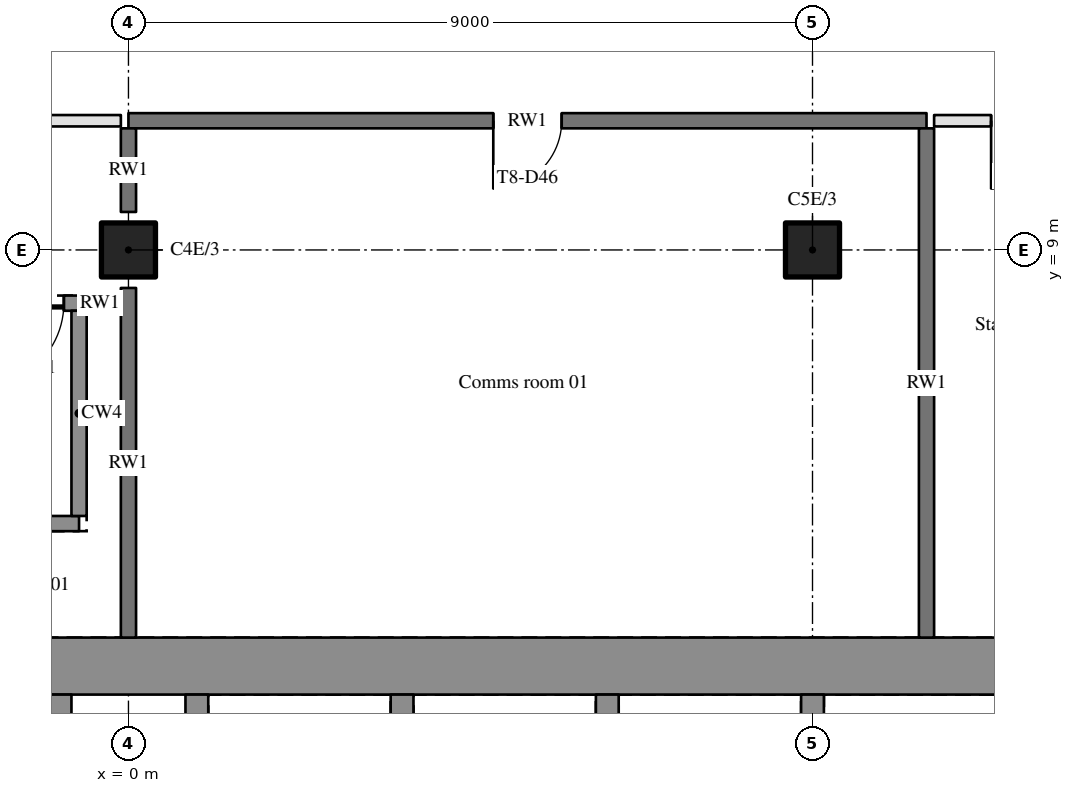
"""IFC4 building model, lengths in metres.
Left out: names, types, materials, properties, quantities, classifications, styles, units other than length and angle.
Written with IfcOpenShell. Run it as: python <this file> out.ifc"""

import sys

from ifc_helpers import new_model, si_unit, direction, frame, frame_2d, origin, origin_2d, place, context, subcontext, project, spatial, rectangle, hollow_circle, extrude, element, fill, save


model = new_model("IFC4")
c1 = context("Model", 3, precision=1e-05, world=origin(), true_north=direction((0.0, 1.0)))
c2 = subcontext(c1, "Body", "Model", "MODEL_VIEW")
j1 = project(units=[si_unit("LENGTHUNIT", "METRE"), si_unit("PLANEANGLEUNIT", "RADIAN")], contexts=[c1])
p1 = place(None, origin())
s1 = spatial("IfcSite", under=j1, at=p1, CompositionType="ELEMENT")
p2 = place(p1, origin())
s2 = spatial("IfcBuilding", under=s1, at=p2, CompositionType="ELEMENT")
p3 = place(p2, frame((0.0, 0.0, 121.5)))
s3 = spatial("IfcBuildingStorey", under=s2, at=p3, CompositionType="ELEMENT", Elevation=121.5)
for number, where, z_axis, x_axis in (
    (1, (0.0, 9.0, 0.0), (0.0, 0.0, 1.0), (1.0, 0.0, 0.0)),
    (2, (9.0, 9.0, 0.0), (0.0, 0.0, 1.0), (1.0, 0.0, 0.0)),
):
    element("IfcColumn", number, at=place(p3, frame(where, z_axis=z_axis, x_axis=x_axis)), inside=s3, PredefinedType="COLUMN", context=c2, shape_type="SweptSolid", body=[
        extrude(hollow_circle(Radius=0.355, WallThickness=0.032, at=origin_2d()), origin(), (0.0, 0.0, 1.0), 3.4),
    ])
p4 = place(p3, frame((-13.0, 3.525, 0.0), z_axis=(0.0, 0.0, 1.0), x_axis=(1.0, 0.0, 0.0)))
e3 = element("IfcWall", 3, at=p4, inside=s3, PredefinedType="SHEAR", context=c2, shape_type="SweptSolid", body=[
    extrude(rectangle(XDim=26.0, YDim=0.75, at=frame_2d((13.0, 0.0))), origin(), (0.0, 0.0, 1.0), 3.4),
])
p5 = place(p3, frame((-7.25, 5.4, 0.0), z_axis=(0.0, 0.0, 1.0), x_axis=(1.0, 0.0, 0.0)))
e4 = element("IfcWall", 4, at=p5, inside=s3, PredefinedType="SHEAR", context=c2, shape_type="SweptSolid", body=[
    extrude(rectangle(XDim=6.6, YDim=0.2, at=frame_2d((3.3, 0.0))), origin(), (0.0, 0.0, 1.0), 3.4),
])
p6 = place(p3, frame((-0.65, 8.3, 0.0), z_axis=(0.0, 0.0, 1.0), x_axis=(-1.0, 0.0, 0.0)))
e5 = element("IfcWall", 5, at=p6, inside=s3, PredefinedType="SHEAR", context=c2, shape_type="SweptSolid", body=[
    extrude(rectangle(XDim=6.6, YDim=0.2, at=frame_2d((3.3, 0.0))), origin(), (0.0, 0.0, 1.0), 3.4),
])
p7 = place(p6, frame((0.2, 0.0, 0.0)))
e6 = element("IfcOpeningElement", 6, at=p7, cuts=e5, PredefinedType="OPENING", context=c2, shape_type="SweptSolid", body=[
    extrude(rectangle(XDim=1.1, YDim=2.1, at=frame_2d((0.55, 1.05))), frame((0.0, 0.11, 0.0), z_axis=(0.0, -1.0, 0.0), x_axis=(1.0, 0.0, 0.0)), (0.0, 0.0, 1.0), 0.22),
])
p8 = place(p3, frame((-0.65, 8.3, 0.0), z_axis=(0.0, 0.0, 1.0), x_axis=(1.0, 0.0, 0.0)))
e7 = element("IfcWall", 7, at=p8, inside=s3, PredefinedType="SOLIDWALL", context=c2, shape_type="SweptSolid", body=[
    extrude(rectangle(XDim=0.55, YDim=0.2, at=frame_2d((0.275, 0.0))), origin(), (0.0, 0.0, 1.0), 2.46),
])
p9 = place(p3, frame((-0.1, 10.7, 0.0), z_axis=(0.0, 0.0, 1.0), x_axis=(-1.0, 0.0, 0.0)))
e8 = element("IfcWall", 8, at=p9, inside=s3, PredefinedType="PARTITIONING", context=c2, shape_type="SweptSolid", body=[
    extrude(rectangle(XDim=7.05, YDim=0.15, at=frame_2d((3.525, 0.0))), origin(), (0.0, 0.0, 1.0), 2.46),
])
p10 = place(p9, frame((3.025, 0.0, 0.0)))
e9 = element("IfcOpeningElement", 9, at=p10, cuts=e8, PredefinedType="OPENING", context=c2, shape_type="SweptSolid", body=[
    extrude(rectangle(XDim=1.0, YDim=2.1, at=frame_2d((0.5, 1.05))), frame((0.0, 0.085, 0.0), z_axis=(0.0, -1.0, 0.0), x_axis=(1.0, 0.0, 0.0)), (0.0, 0.0, 1.0), 0.17),
])
p11 = place(p3, frame((10.5, 10.7, 0.0), z_axis=(0.0, 0.0, 1.0), x_axis=(-1.0, 0.0, 0.0)))
e10 = element("IfcWall", 10, at=p11, inside=s3, PredefinedType="SOLIDWALL", context=c2, shape_type="SweptSolid", body=[
    extrude(rectangle(XDim=10.5, YDim=0.2, at=frame_2d((5.25, 0.0))), origin(), (0.0, 0.0, 1.0), 2.46),
])
p12 = place(p11, frame((4.8, 0.0, 0.0)))
e11 = element("IfcOpeningElement", 11, at=p12, cuts=e10, PredefinedType="OPENING", context=c2, shape_type="SweptSolid", body=[
    extrude(rectangle(XDim=0.9, YDim=2.1, at=frame_2d((0.45, 1.05))), frame((0.0, 0.11, 0.0), z_axis=(0.0, -1.0, 0.0), x_axis=(1.0, 0.0, 0.0)), (0.0, 0.0, 1.0), 0.22),
])
p13 = place(p3, frame((16.05, 10.7, 0.0), z_axis=(0.0, 0.0, 1.0), x_axis=(-1.0, 0.0, 0.0)))
e12 = element("IfcWall", 12, at=p13, inside=s3, PredefinedType="PARTITIONING", context=c2, shape_type="SweptSolid", body=[
    extrude(rectangle(XDim=5.45, YDim=0.15, at=frame_2d((2.725, 0.0))), origin(), (0.0, 0.0, 1.0), 2.46),
])
p14 = place(p13, frame((3.8, 0.0, 0.0)))
e13 = element("IfcOpeningElement", 13, at=p14, cuts=e12, PredefinedType="OPENING", context=c2, shape_type="SweptSolid", body=[
    extrude(rectangle(XDim=0.9, YDim=2.1, at=frame_2d((0.45, 1.05))), frame((0.0, 0.085, 0.0), z_axis=(0.0, -1.0, 0.0), x_axis=(1.0, 0.0, 0.0)), (0.0, 0.0, 1.0), 0.17),
])
p15 = place(p13, frame((1.075, 0.0, 0.0)))
e14 = element("IfcOpeningElement", 14, at=p15, cuts=e12, PredefinedType="OPENING", context=c2, shape_type="SweptSolid", body=[
    extrude(rectangle(XDim=0.9, YDim=2.1, at=frame_2d((0.45, 1.05))), frame((0.0, 0.085, 0.0), z_axis=(0.0, -1.0, 0.0), x_axis=(1.0, 0.0, 0.0)), (0.0, 0.0, 1.0), 0.17),
])
p16 = place(p3, frame((-0.9, 0.65, 0.0), z_axis=(0.0, 0.0, 1.0), x_axis=(0.0, 1.0, 0.0)))
e15 = element("IfcWall", 15, at=p16, inside=s3, PredefinedType="SHEAR", context=c2, shape_type="SweptSolid", body=[
    extrude(rectangle(XDim=2.5, YDim=0.3, at=frame_2d((1.25, 0.0))), origin(), (0.0, 0.0, 1.0), 3.4),
])
p17 = place(p3, frame((-0.65, 5.5, 0.0), z_axis=(0.0, 0.0, 1.0), x_axis=(0.0, 1.0, 0.0)))
e16 = element("IfcWall", 16, at=p17, inside=s3, PredefinedType="SHEAR", context=c2, shape_type="SweptSolid", body=[
    extrude(rectangle(XDim=2.7, YDim=0.2, at=frame_2d((1.35, 0.0))), origin(), (0.0, 0.0, 1.0), 3.4),
])
p18 = place(p3, frame((0.0, 3.9, 0.0), z_axis=(0.0, 0.0, 1.0), x_axis=(0.0, 1.0, 0.0)))
e17 = element("IfcWall", 17, at=p18, inside=s3, PredefinedType="SOLIDWALL", context=c2, shape_type="SweptSolid", body=[
    extrude(rectangle(XDim=4.6, YDim=0.2, at=frame_2d((2.3, 0.0))), origin(), (0.0, 0.0, 1.0), 2.46),
])
p19 = place(p3, frame((0.0, 9.5, 0.0), z_axis=(0.0, 0.0, 1.0), x_axis=(0.0, 1.0, 0.0)))
e18 = element("IfcWall", 18, at=p19, inside=s3, PredefinedType="SOLIDWALL", context=c2, shape_type="SweptSolid", body=[
    extrude(rectangle(XDim=1.1, YDim=0.2, at=frame_2d((0.55, 0.0))), origin(), (0.0, 0.0, 1.0), 2.46),
])
for number, where, z_axis, x_axis in (
    (19, (0.9, 0.65, 0.0), (0.0, 0.0, 1.0), (0.0, 1.0, 0.0)),
    (20, (3.6, 0.65, 0.0), (0.0, 0.0, 1.0), (0.0, 1.0, 0.0)),
    (21, (6.3, 0.65, 0.0), (0.0, 0.0, 1.0), (0.0, 1.0, 0.0)),
):
    element("IfcWall", number, at=place(p3, frame(where, z_axis=z_axis, x_axis=x_axis)), inside=s3, PredefinedType="SHEAR", context=c2, shape_type="SweptSolid", body=[
        extrude(rectangle(XDim=2.5, YDim=0.3, at=frame_2d((1.25, 0.0))), origin(), (0.0, 0.0, 1.0), 3.4),
    ])
p20 = place(p3, frame((9.0, 0.8, 0.0), z_axis=(0.0, 0.0, 1.0), x_axis=(0.0, 1.0, 0.0)))
e22 = element("IfcWall", 22, at=p20, inside=s3, PredefinedType="SHEAR", context=c2, shape_type="SweptSolid", body=[
    extrude(rectangle(XDim=2.35, YDim=0.3, at=frame_2d((1.175, 0.0))), origin(), (0.0, 0.0, 1.0), 3.4),
])
p21 = place(p3, frame((10.5, 3.9, 0.0), z_axis=(0.0, 0.0, 1.0), x_axis=(0.0, 1.0, 0.0)))
e23 = element("IfcWall", 23, at=p21, inside=s3, PredefinedType="SOLIDWALL", context=c2, shape_type="SweptSolid", body=[
    extrude(rectangle(XDim=6.7, YDim=0.2, at=frame_2d((3.35, 0.0))), origin(), (0.0, 0.0, 1.0), 2.46),
])
p22 = place(p7, origin())
e24 = element("IfcDoor", 24, at=p22, inside=s3, OperationType="SINGLE_SWING_RIGHT", PredefinedType="DOOR", context=c2, shape_type="SweptSolid", body=[
    extrude(rectangle(XDim=1.1, YDim=2.1, at=frame_2d((0.55, 1.05))), frame((0.0, 0.025, 0.0), z_axis=(0.0, -1.0, 0.0), x_axis=(1.0, 0.0, 0.0)), (0.0, 0.0, 1.0), 0.05),
])
fill(e6, e24)
p23 = place(p12, origin())
e25 = element("IfcDoor", 25, at=p23, inside=s3, OperationType="SINGLE_SWING_RIGHT", PredefinedType="DOOR", context=c2, shape_type="SweptSolid", body=[
    extrude(rectangle(XDim=0.9, YDim=2.1, at=frame_2d((0.45, 1.05))), frame((0.0, 0.025, 0.0), z_axis=(0.0, -1.0, 0.0), x_axis=(1.0, 0.0, 0.0)), (0.0, 0.0, 1.0), 0.05),
])
fill(e11, e25)
p24 = place(p14, origin())
e26 = element("IfcDoor", 26, at=p24, inside=s3, OperationType="SINGLE_SWING_RIGHT", PredefinedType="DOOR", context=c2, shape_type="SweptSolid", body=[
    extrude(rectangle(XDim=0.9, YDim=2.1, at=frame_2d((0.45, 1.05))), frame((0.0, 0.025, 0.0), z_axis=(0.0, -1.0, 0.0), x_axis=(1.0, 0.0, 0.0)), (0.0, 0.0, 1.0), 0.05),
])
fill(e13, e26)
save(model, sys.argv[1])
